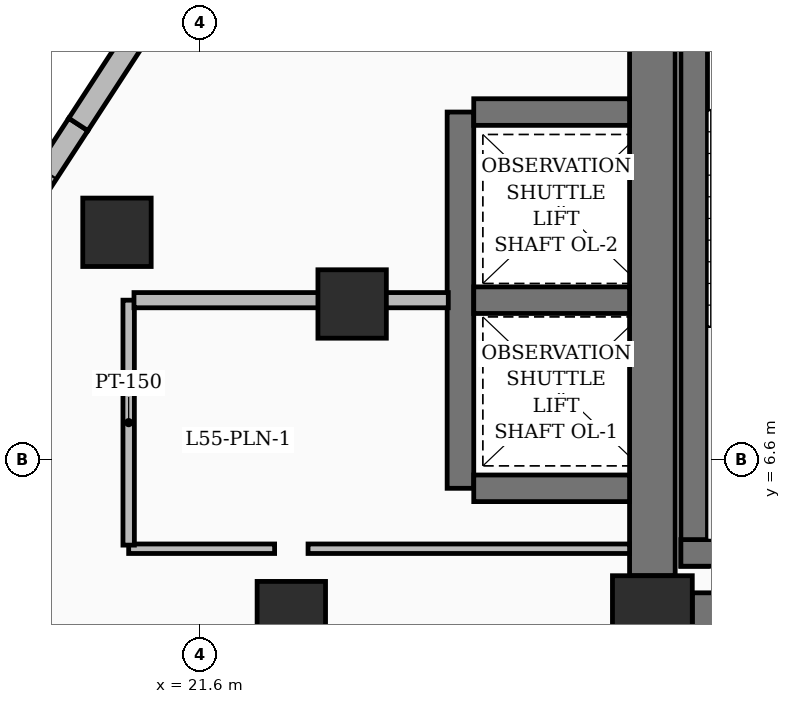
"""IFC4 building model, lengths in metres.
Left out: names, types, materials, properties, quantities, classifications, styles, units other than length and angle.
Written with IfcOpenShell. Run it as: python <this file> out.ifc"""

import sys

from ifc_helpers import new_model, si_unit, direction, frame, frame_2d, origin, origin_2d, place, context, subcontext, project, spatial, rectangle, extrude, element, save


model = new_model("IFC4")
c1 = context("Model", 3, precision=1e-05, world=origin(), true_north=direction((0.0, 1.0)))
c2 = subcontext(c1, "Body", "Model", "MODEL_VIEW")
j1 = project(units=[si_unit("LENGTHUNIT", "METRE"), si_unit("PLANEANGLEUNIT", "RADIAN")], contexts=[c1])
p1 = place(None, origin())
s1 = spatial("IfcSite", under=j1, at=p1, CompositionType="ELEMENT")
p2 = place(p1, origin())
s2 = spatial("IfcBuilding", under=s1, at=p2, CompositionType="ELEMENT")
p3 = place(p2, frame((0.0, 0.0, 214.5)))
s3 = spatial("IfcBuildingStorey", under=s2, at=p3, CompositionType="ELEMENT", Elevation=214.5)
p4 = place(p3, frame((27.55, 4.55, 0.0), z_axis=(0.0, 0.0, 1.0), x_axis=(1.0, 0.0, 0.0)))
e1 = element("IfcColumn", 1, at=p4, inside=s3, PredefinedType="COLUMN", context=c2, shape_type="SweptSolid", body=[
    extrude(rectangle(XDim=1.05, YDim=1.05, at=origin_2d()), origin(), (0.0, 0.0, 1.0), 3.75),
])
for number, where, z_axis, x_axis in (
    (2, (22.8, 4.55, 0.0), (0.0, 0.0, 1.0), (1.0, 0.0, 0.0)),
    (3, (23.6, 8.65, 0.0), (0.0, 0.0, 1.0), (1.0, 0.0, 0.0)),
):
    element("IfcColumn", number, at=place(p3, frame(where, z_axis=z_axis, x_axis=x_axis)), inside=s3, PredefinedType="COLUMN", context=c2, shape_type="SweptSolid", body=[
        extrude(rectangle(XDim=0.9, YDim=0.9, at=origin_2d()), origin(), (0.0, 0.0, 1.0), 3.75),
    ])
p5 = place(p3, frame((28.075, 4.55, 0.0), z_axis=(0.0, 0.0, 1.0), x_axis=(1.0, 0.0, 0.0)))
e4 = element("IfcWall", 4, at=p5, inside=s3, PredefinedType="SHEAR", context=c2, shape_type="SweptSolid", body=[
    extrude(rectangle(XDim=6.55, YDim=0.6, at=frame_2d((3.275, 0.0))), origin(), (0.0, 0.0, 1.0), 3.75),
])
p6 = place(p3, frame((27.55, 5.075, 0.0), z_axis=(0.0, 0.0, 1.0), x_axis=(0.0, 1.0, 0.0)))
e5 = element("IfcWall", 5, at=p6, inside=s3, PredefinedType="SHEAR", context=c2, shape_type="SweptSolid", body=[
    extrude(rectangle(XDim=9.15, YDim=0.6, at=frame_2d((4.575, 0.0))), origin(), (0.0, 0.0, 1.0), 3.75),
])
p7 = place(p3, frame((28.1, 5.2, 0.0), z_axis=(0.0, 0.0, 1.0), x_axis=(0.0, 1.0, 0.0)))
e6 = element("IfcWall", 6, at=p7, inside=s3, PredefinedType="SOLIDWALL", context=c2, shape_type="SweptSolid", body=[
    extrude(rectangle(XDim=9.25, YDim=0.35, at=frame_2d((4.625, 0.0))), origin(), (0.0, 0.0, 1.0), 3.75),
])
p8 = place(p3, frame((27.925, 5.375, 0.0), z_axis=(0.0, 0.0, 1.0), x_axis=(1.0, 0.0, 0.0)))
e7 = element("IfcWall", 7, at=p8, inside=s3, PredefinedType="SOLIDWALL", context=c2, shape_type="SweptSolid", body=[
    extrude(rectangle(XDim=3.55, YDim=0.35, at=frame_2d((1.775, 0.0))), origin(), (0.0, 0.0, 1.0), 3.75),
])
p9 = place(p3, frame((25.025, 6.225, 0.0), z_axis=(0.0, 0.0, 1.0), x_axis=(0.0, 1.0, 0.0)))
e8 = element("IfcWall", 8, at=p9, inside=s3, PredefinedType="SOLIDWALL", context=c2, shape_type="SweptSolid", body=[
    extrude(rectangle(XDim=4.95, YDim=0.35, at=frame_2d((2.475, 0.0))), origin(), (0.0, 0.0, 1.0), 3.75),
])
for number, where, z_axis, x_axis in (
    (9, (25.2, 6.225, 0.0), (0.0, 0.0, 1.0), (1.0, 0.0, 0.0)),
    (10, (25.2, 8.7, 0.0), (0.0, 0.0, 1.0), (1.0, 0.0, 0.0)),
    (11, (25.2, 11.175, 0.0), (0.0, 0.0, 1.0), (1.0, 0.0, 0.0)),
):
    element("IfcWall", number, at=place(p3, frame(where, z_axis=z_axis, x_axis=x_axis)), inside=s3, PredefinedType="SOLIDWALL", context=c2, shape_type="SweptSolid", body=[
        extrude(rectangle(XDim=2.05, YDim=0.35, at=frame_2d((1.025, 0.0))), origin(), (0.0, 0.0, 1.0), 3.75),
    ])
p10 = place(p3, frame((20.506, 9.593, 0.0), z_axis=(0.0, 0.0, 1.0), x_axis=(1.0, 0.0, 0.0)))
e12 = element("IfcColumn", 12, at=p10, inside=s3, PredefinedType="COLUMN", context=c2, shape_type="SweptSolid", body=[
    extrude(rectangle(XDim=0.9, YDim=0.9, at=origin_2d()), origin(), (0.0, 0.0, 1.0), 3.75),
])
p11 = place(p3, frame((16.441, 5.55, 0.0), z_axis=(0.0, 0.0, 1.0), x_axis=(0.545651760549, 0.838012026292, 0.0)))
e13 = element("IfcWall", 13, at=p11, inside=s3, PredefinedType="SOLIDWALL", context=c2, shape_type="SweptSolid", body=[
    extrude(rectangle(XDim=6.518, YDim=0.3, at=frame_2d((3.259, 0.0))), origin(), (0.0, 0.0, 1.0), 3.5),
])
p12 = place(p11, frame((1.51, 0.0, 0.6)))
e14 = element("IfcOpeningElement", 14, at=p12, cuts=e13, PredefinedType="OPENING", context=c2, shape_type="SweptSolid", body=[
    extrude(rectangle(XDim=1.8, YDim=2.1, at=frame_2d((0.9, 1.05))), frame((0.0, 0.16, 0.0), z_axis=(0.0, -1.0, 0.0), x_axis=(1.0, 0.0, 0.0)), (0.0, 0.0, 1.0), 0.32),
])
p13 = place(p11, frame((4.56, 0.0, 0.8)))
e15 = element("IfcOpeningElement", 15, at=p13, cuts=e13, PredefinedType="OPENING", context=c2, shape_type="SweptSolid", body=[
    extrude(rectangle(XDim=1.2, YDim=1.8, at=frame_2d((0.6, 0.9))), frame((0.0, 0.16, 0.0), z_axis=(0.0, -1.0, 0.0), x_axis=(1.0, 0.0, 0.0)), (0.0, 0.0, 1.0), 0.32),
])
p14 = place(p3, frame((19.998, 11.012, 0.0), z_axis=(0.0, 0.0, 1.0), x_axis=(0.545631860444, 0.838024983439, 0.0)))
e16 = element("IfcWall", 16, at=p14, inside=s3, PredefinedType="SOLIDWALL", context=c2, shape_type="SweptSolid", body=[
    extrude(rectangle(XDim=6.853, YDim=0.3, at=frame_2d((3.426, 0.0))), origin(), (0.0, 0.0, 1.0), 3.5),
])
p15 = place(p14, frame((2.725, 0.0, 0.55)))
e17 = element("IfcOpeningElement", 17, at=p15, cuts=e16, PredefinedType="OPENING", context=c2, shape_type="SweptSolid", body=[
    extrude(rectangle(XDim=1.6, YDim=2.2, at=frame_2d((0.8, 1.1))), frame((0.0, 0.16, 0.0), z_axis=(0.0, -1.0, 0.0), x_axis=(1.0, 0.0, 0.0)), (0.0, 0.0, 1.0), 0.32),
])
p16 = place(p3, frame((22.58, 5.43, 0.0), z_axis=(0.0, 0.0, 1.0), x_axis=(-1.0, 0.0, 0.0)))
e18 = element("IfcWall", 18, at=p16, inside=s3, PredefinedType="PARTITIONING", context=c2, shape_type="SweptSolid", body=[
    extrude(rectangle(XDim=1.92, YDim=0.125, at=frame_2d((0.96, 0.0))), origin(), (0.0, 0.0, 1.0), 2.82),
])
p17 = place(p3, frame((27.25, 5.43, 0.0), z_axis=(0.0, 0.0, 1.0), x_axis=(-1.0, 0.0, 0.0)))
e19 = element("IfcWall", 19, at=p17, inside=s3, PredefinedType="PARTITIONING", context=c2, shape_type="SweptSolid", body=[
    extrude(rectangle(XDim=4.23, YDim=0.125, at=frame_2d((2.115, 0.0))), origin(), (0.0, 0.0, 1.0), 3.5),
])
p18 = place(p3, frame((20.66, 5.478, 0.0), z_axis=(0.0, 0.0, 1.0), x_axis=(0.0, 1.0, 0.0)))
e20 = element("IfcWall", 20, at=p18, inside=s3, PredefinedType="PARTITIONING", context=c2, shape_type="SweptSolid", body=[
    extrude(rectangle(XDim=3.222, YDim=0.15, at=frame_2d((1.611, 0.0))), origin(), (0.0, 0.0, 1.0), 3.5),
])
p19 = place(p3, frame((23.6, 8.7, 0.0), z_axis=(0.0, 0.0, 1.0), x_axis=(-1.0, 0.0, 0.0)))
e21 = element("IfcWall", 21, at=p19, inside=s3, PredefinedType="PARTITIONING", context=c2, shape_type="SweptSolid", body=[
    extrude(rectangle(XDim=2.87, YDim=0.2, at=frame_2d((1.435, 0.0))), origin(), (0.0, 0.0, 1.0), 2.685),
])
p20 = place(p3, frame((24.865, 8.7, 0.0), z_axis=(0.0, 0.0, 1.0), x_axis=(-1.0, 0.0, 0.0)))
e22 = element("IfcWall", 22, at=p20, inside=s3, PredefinedType="PARTITIONING", context=c2, shape_type="SweptSolid", body=[
    extrude(rectangle(XDim=1.265, YDim=0.2, at=frame_2d((0.632, 0.0))), origin(), (0.0, 0.0, 1.0), 3.5),
])
save(model, sys.argv[1])
